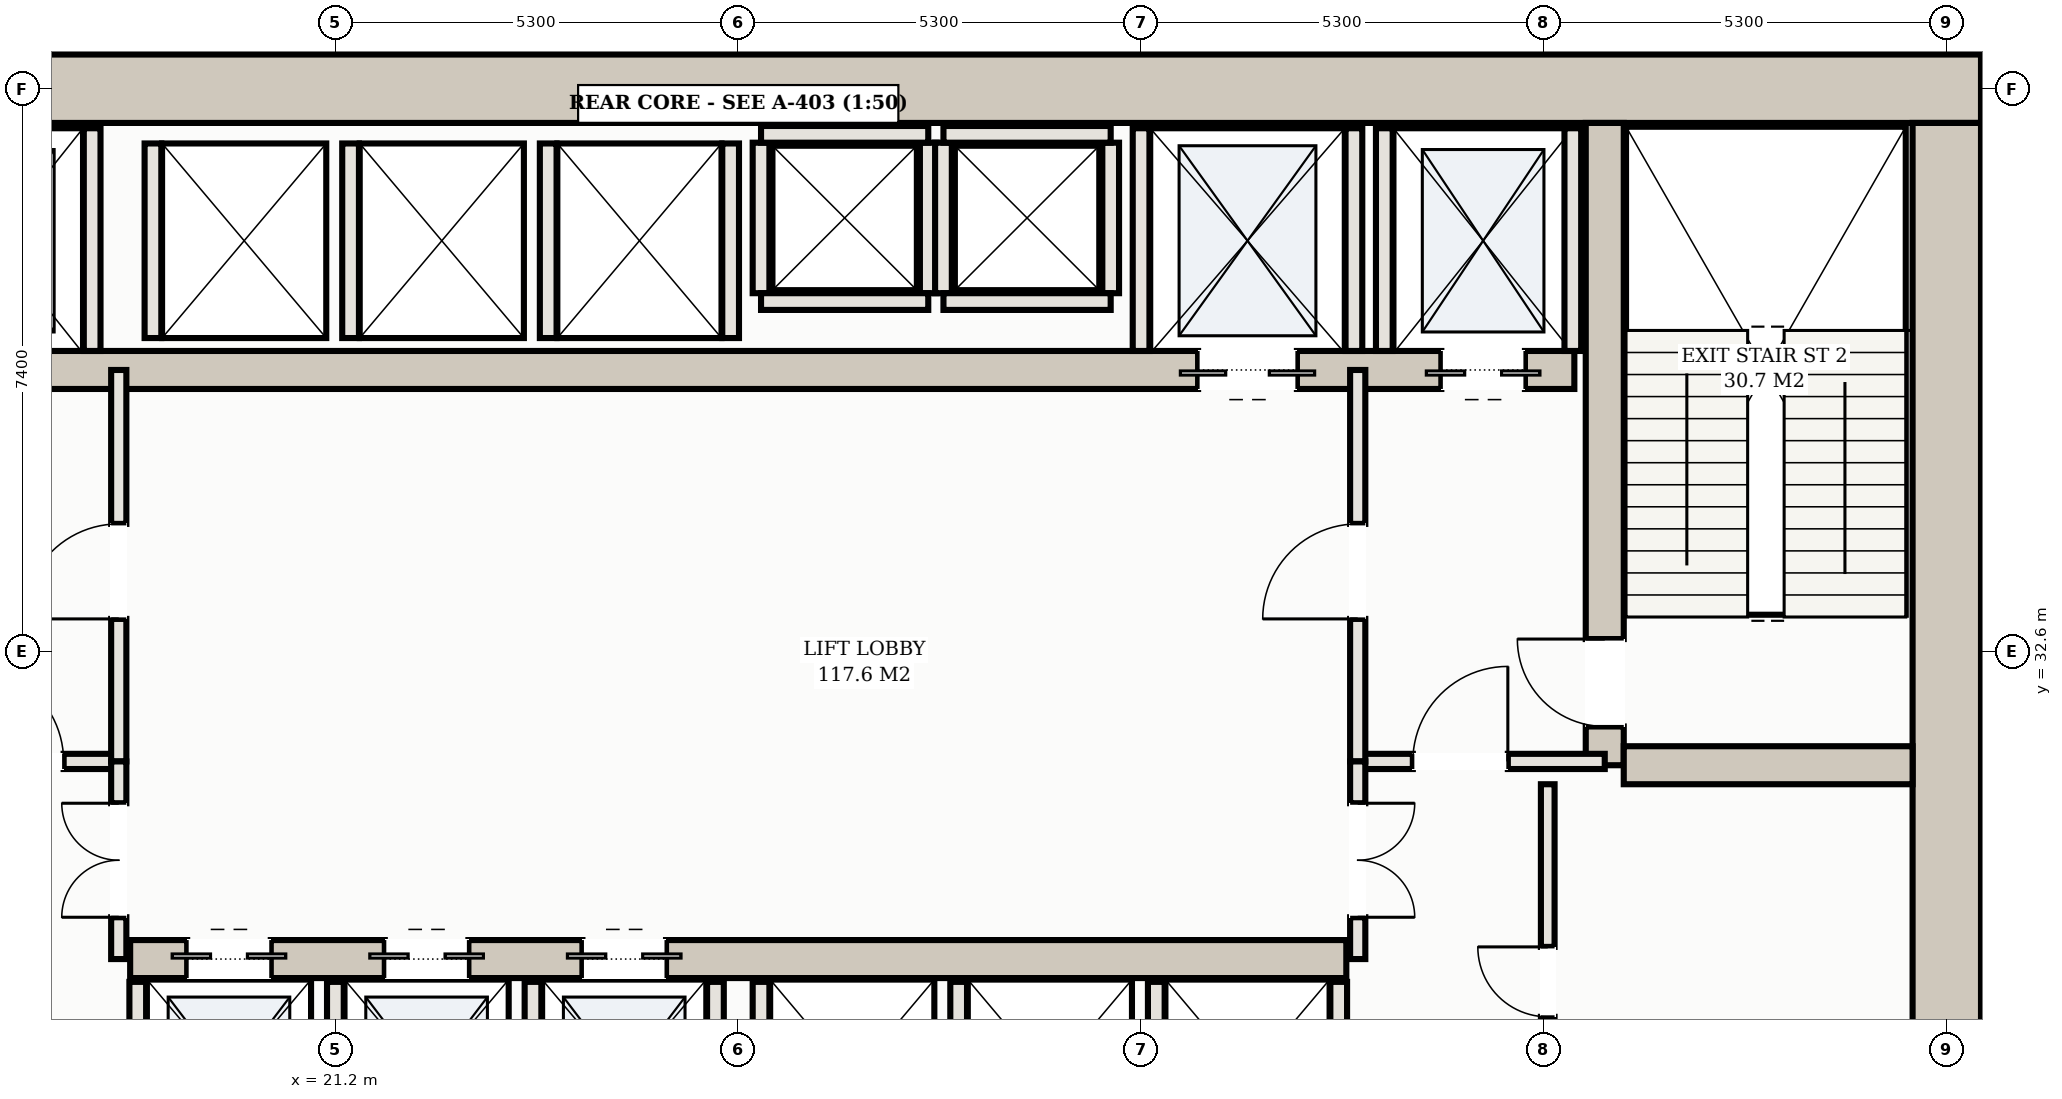
"""IFC4 building model, lengths in metres.
Left out: names, types, materials, properties, quantities, classifications, styles, units other than length and angle.
Written with IfcOpenShell. Run it as: python <this file> out.ifc"""

import sys

from ifc_helpers import new_model, si_unit, direction, frame, frame_2d, origin, place, context, subcontext, project, spatial, rectangle, extrude, element, fill, save


model = new_model("IFC4")
c1 = context("Model", 3, precision=1e-05, world=origin(), true_north=direction((0.0, 1.0)))
c2 = subcontext(c1, "Body", "Model", "MODEL_VIEW")
j1 = project(units=[si_unit("LENGTHUNIT", "METRE"), si_unit("PLANEANGLEUNIT", "RADIAN")], contexts=[c1])
p1 = place(None, origin())
s1 = spatial("IfcSite", under=j1, at=p1, CompositionType="ELEMENT")
p2 = place(p1, origin())
s2 = spatial("IfcBuilding", under=s1, at=p2, CompositionType="ELEMENT")
p3 = place(p2, frame((0.0, 0.0, 5.2)))
s3 = spatial("IfcBuildingStorey", under=s2, at=p3, CompositionType="ELEMENT", Elevation=5.2)
p4 = place(p3, frame((10.15, 40.0, 0.0), z_axis=(0.0, 0.0, 1.0), x_axis=(1.0, 0.0, 0.0)))
e1 = element("IfcWall", 1, at=p4, inside=s3, PredefinedType="SHEAR", context=c2, shape_type="SweptSolid", body=[
    extrude(rectangle(XDim=32.7, YDim=0.9, at=frame_2d((16.35, 0.0))), origin(), (0.0, 0.0, 1.0), 4.35),
])
p5 = place(p3, frame((42.4, 25.65, 0.0), z_axis=(0.0, 0.0, 1.0), x_axis=(0.0, 1.0, 0.0)))
e2 = element("IfcWall", 2, at=p5, inside=s3, PredefinedType="SHEAR", context=c2, shape_type="SweptSolid", body=[
    extrude(rectangle(XDim=13.9, YDim=0.9, at=frame_2d((6.95, 0.0))), origin(), (0.0, 0.0, 1.0), 4.35),
])
p6 = place(p3, frame((37.9, 31.1, 0.0), z_axis=(0.0, 0.0, 1.0), x_axis=(0.0, 1.0, 0.0)))
e3 = element("IfcWall", 3, at=p6, inside=s3, PredefinedType="SHEAR", context=c2, shape_type="SweptSolid", body=[
    extrude(rectangle(XDim=8.45, YDim=0.5, at=frame_2d((4.225, 0.0))), origin(), (0.0, 0.0, 1.0), 4.35),
])
p7 = place(p6, frame((0.51, 0.0, 0.0)))
e4 = element("IfcOpeningElement", 4, at=p7, cuts=e3, PredefinedType="OPENING", context=c2, shape_type="SweptSolid", body=[
    extrude(rectangle(XDim=1.15, YDim=2.2, at=frame_2d((0.575, 1.1))), frame((0.0, 0.26, 0.0), z_axis=(0.0, -1.0, 0.0), x_axis=(1.0, 0.0, 0.0)), (0.0, 0.0, 1.0), 0.52),
])
p8 = place(p3, frame((38.15, 31.1, 0.0), z_axis=(0.0, 0.0, 1.0), x_axis=(1.0, 0.0, 0.0)))
e5 = element("IfcWall", 5, at=p8, inside=s3, PredefinedType="SHEAR", context=c2, shape_type="SweptSolid", body=[
    extrude(rectangle(XDim=3.8, YDim=0.5, at=frame_2d((1.9, 0.0))), origin(), (0.0, 0.0, 1.0), 4.35),
])
p9 = place(p3, frame((15.5, 36.3, 0.0), z_axis=(0.0, 0.0, 1.0), x_axis=(1.0, 0.0, 0.0)))
e6 = element("IfcWall", 6, at=p9, inside=s3, PredefinedType="SHEAR", context=c2, shape_type="SweptSolid", body=[
    extrude(rectangle(XDim=22.0, YDim=0.5, at=frame_2d((11.0, 0.0))), origin(), (0.0, 0.0, 1.0), 4.35),
])
p10 = place(p9, frame((0.65, 0.0, 0.0)))
e7 = element("IfcOpeningElement", 7, at=p10, cuts=e6, PredefinedType="OPENING", context=c2, shape_type="SweptSolid", body=[
    extrude(rectangle(XDim=1.1, YDim=2.15, at=frame_2d((0.55, 1.075))), frame((0.0, 0.26, 0.0), z_axis=(0.0, -1.0, 0.0), x_axis=(1.0, 0.0, 0.0)), (0.0, 0.0, 1.0), 0.52),
])
p11 = place(p9, frame((20.25, 0.0, 0.0)))
e8 = element("IfcOpeningElement", 8, at=p11, cuts=e6, PredefinedType="OPENING", context=c2, shape_type="SweptSolid", body=[
    extrude(rectangle(XDim=1.1, YDim=2.15, at=frame_2d((0.55, 1.075))), frame((0.0, 0.26, 0.0), z_axis=(0.0, -1.0, 0.0), x_axis=(1.0, 0.0, 0.0)), (0.0, 0.0, 1.0), 0.52),
])
p12 = place(p9, frame((17.05, 0.0, 0.0)))
e9 = element("IfcOpeningElement", 9, at=p12, cuts=e6, PredefinedType="OPENING", context=c2, shape_type="SweptSolid", body=[
    extrude(rectangle(XDim=1.3, YDim=2.2, at=frame_2d((0.65, 1.1))), frame((0.0, 0.26, 0.0), z_axis=(0.0, -1.0, 0.0), x_axis=(1.0, 0.0, 0.0)), (0.0, 0.0, 1.0), 0.52),
])
p13 = place(p3, frame((18.5, 28.55, 0.0), z_axis=(0.0, 0.0, 1.0), x_axis=(1.0, 0.0, 0.0)))
e10 = element("IfcWall", 10, at=p13, inside=s3, PredefinedType="SHEAR", context=c2, shape_type="SweptSolid", body=[
    extrude(rectangle(XDim=16.0, YDim=0.5, at=frame_2d((8.0, 0.0))), origin(), (0.0, 0.0, 1.0), 4.35),
])
p14 = place(p13, frame((0.75, 0.0, 0.0)))
e11 = element("IfcOpeningElement", 11, at=p14, cuts=e10, PredefinedType="OPENING", context=c2, shape_type="SweptSolid", body=[
    extrude(rectangle(XDim=1.1, YDim=2.15, at=frame_2d((0.55, 1.075))), frame((0.0, 0.26, 0.0), z_axis=(0.0, -1.0, 0.0), x_axis=(1.0, 0.0, 0.0)), (0.0, 0.0, 1.0), 0.52),
])
p15 = place(p13, frame((3.35, 0.0, 0.0)))
e12 = element("IfcOpeningElement", 12, at=p15, cuts=e10, PredefinedType="OPENING", context=c2, shape_type="SweptSolid", body=[
    extrude(rectangle(XDim=1.1, YDim=2.15, at=frame_2d((0.55, 1.075))), frame((0.0, 0.26, 0.0), z_axis=(0.0, -1.0, 0.0), x_axis=(1.0, 0.0, 0.0)), (0.0, 0.0, 1.0), 0.52),
])
p16 = place(p13, frame((5.95, 0.0, 0.0)))
e13 = element("IfcOpeningElement", 13, at=p16, cuts=e10, PredefinedType="OPENING", context=c2, shape_type="SweptSolid", body=[
    extrude(rectangle(XDim=1.1, YDim=2.15, at=frame_2d((0.55, 1.075))), frame((0.0, 0.26, 0.0), z_axis=(0.0, -1.0, 0.0), x_axis=(1.0, 0.0, 0.0)), (0.0, 0.0, 1.0), 0.52),
])
for number, where, z_axis, x_axis in (
    (14, (18.0, 36.55, 0.0), (0.0, 0.0, 1.0), (0.0, 1.0, 0.0)),
    (15, (35.0, 36.55, 0.0), (0.0, 0.0, 1.0), (0.0, 1.0, 0.0)),
    (16, (37.48, 36.55, 0.0), (0.0, 0.0, 1.0), (0.0, 1.0, 0.0)),
    (17, (31.8, 36.55, 0.0), (0.0, 0.0, 1.0), (0.0, 1.0, 0.0)),
    (18, (34.6, 36.55, 0.0), (0.0, 0.0, 1.0), (0.0, 1.0, 0.0)),
):
    element("IfcWall", number, at=place(p3, frame(where, z_axis=z_axis, x_axis=x_axis)), inside=s3, PredefinedType="SOLIDWALL", context=c2, shape_type="SweptSolid", body=[
        extrude(rectangle(XDim=2.93, YDim=0.22, at=frame_2d((1.465, 0.0))), origin(), (0.0, 0.0, 1.0), 4.35),
    ])
for number, where, z_axis, x_axis in (
    (19, (18.6, 25.72, 0.0), (0.0, 0.0, 1.0), (0.0, 1.0, 0.0)),
    (20, (21.2, 25.72, 0.0), (0.0, 0.0, 1.0), (0.0, 1.0, 0.0)),
    (21, (23.8, 25.72, 0.0), (0.0, 0.0, 1.0), (0.0, 1.0, 0.0)),
    (22, (26.2, 25.72, 0.0), (0.0, 0.0, 1.0), (0.0, 1.0, 0.0)),
    (23, (26.8, 25.72, 0.0), (0.0, 0.0, 1.0), (0.0, 1.0, 0.0)),
    (24, (29.4, 25.72, 0.0), (0.0, 0.0, 1.0), (0.0, 1.0, 0.0)),
    (25, (32.0, 25.72, 0.0), (0.0, 0.0, 1.0), (0.0, 1.0, 0.0)),
    (26, (34.4, 25.72, 0.0), (0.0, 0.0, 1.0), (0.0, 1.0, 0.0)),
):
    element("IfcWall", number, at=place(p3, frame(where, z_axis=z_axis, x_axis=x_axis)), inside=s3, PredefinedType="SOLIDWALL", context=c2, shape_type="SweptSolid", body=[
        extrude(rectangle(XDim=2.53, YDim=0.22, at=frame_2d((1.265, 0.0))), origin(), (0.0, 0.0, 1.0), 4.35),
    ])
for number, where, z_axis, x_axis in (
    (27, (18.8, 36.72, 0.0), (0.0, 0.0, 1.0), (0.0, 1.0, 0.0)),
    (28, (21.4, 36.72, 0.0), (0.0, 0.0, 1.0), (0.0, 1.0, 0.0)),
    (29, (24.0, 36.72, 0.0), (0.0, 0.0, 1.0), (0.0, 1.0, 0.0)),
    (30, (26.4, 36.72, 0.0), (0.0, 0.0, 1.0), (0.0, 1.0, 0.0)),
):
    element("IfcWall", number, at=place(p3, frame(where, z_axis=z_axis, x_axis=x_axis)), inside=s3, PredefinedType="SOLIDWALL", context=c2, shape_type="SweptSolid", body=[
        extrude(rectangle(XDim=2.56, YDim=0.22, at=frame_2d((1.28, 0.0))), origin(), (0.0, 0.0, 1.0), 4.35),
    ])
for number, where, z_axis, x_axis in (
    (31, (26.8, 37.31, 0.0), (0.0, 0.0, 1.0), (0.0, 1.0, 0.0)),
    (32, (29.0, 37.31, 0.0), (0.0, 0.0, 1.0), (0.0, 1.0, 0.0)),
):
    element("IfcWall", number, at=place(p3, frame(where, z_axis=z_axis, x_axis=x_axis)), inside=s3, PredefinedType="SOLIDWALL", context=c2, shape_type="SweptSolid", body=[
        extrude(rectangle(XDim=1.98, YDim=0.22, at=frame_2d((0.99, 0.0))), origin(), (0.0, 0.0, 1.0), 4.35),
    ])
for number, where, z_axis, x_axis in (
    (33, (26.8, 39.4, 0.0), (0.0, 0.0, 1.0), (1.0, 0.0, 0.0)),
    (34, (26.8, 37.2, 0.0), (0.0, 0.0, 1.0), (1.0, 0.0, 0.0)),
):
    element("IfcWall", number, at=place(p3, frame(where, z_axis=z_axis, x_axis=x_axis)), inside=s3, PredefinedType="SOLIDWALL", context=c2, shape_type="SweptSolid", body=[
        extrude(rectangle(XDim=2.2, YDim=0.22, at=frame_2d((1.1, 0.0))), origin(), (0.0, 0.0, 1.0), 4.35),
    ])
for number, where, z_axis, x_axis in (
    (35, (29.2, 37.31, 0.0), (0.0, 0.0, 1.0), (0.0, 1.0, 0.0)),
    (36, (31.4, 37.31, 0.0), (0.0, 0.0, 1.0), (0.0, 1.0, 0.0)),
):
    element("IfcWall", number, at=place(p3, frame(where, z_axis=z_axis, x_axis=x_axis)), inside=s3, PredefinedType="SOLIDWALL", context=c2, shape_type="SweptSolid", body=[
        extrude(rectangle(XDim=1.98, YDim=0.22, at=frame_2d((0.99, 0.0))), origin(), (0.0, 0.0, 1.0), 4.35),
    ])
for number, where, z_axis, x_axis in (
    (37, (29.2, 39.4, 0.0), (0.0, 0.0, 1.0), (1.0, 0.0, 0.0)),
    (38, (29.2, 37.2, 0.0), (0.0, 0.0, 1.0), (1.0, 0.0, 0.0)),
):
    element("IfcWall", number, at=place(p3, frame(where, z_axis=z_axis, x_axis=x_axis)), inside=s3, PredefinedType="SOLIDWALL", context=c2, shape_type="SweptSolid", body=[
        extrude(rectangle(XDim=2.2, YDim=0.22, at=frame_2d((1.1, 0.0))), origin(), (0.0, 0.0, 1.0), 4.35),
    ])
p17 = place(p3, frame((15.1, 31.15, 0.0), z_axis=(0.0, 0.0, 1.0), x_axis=(1.0, 0.0, 0.0)))
e39 = element("IfcWall", 39, at=p17, inside=s3, PredefinedType="PARTITIONING", context=c2, shape_type="SweptSolid", body=[
    extrude(rectangle(XDim=3.25, YDim=0.2, at=frame_2d((1.625, 0.0))), origin(), (0.0, 0.0, 1.0), 4.35),
])
p18 = place(p17, frame((1.275, 0.0, 0.0)))
e40 = element("IfcOpeningElement", 40, at=p18, cuts=e39, PredefinedType="OPENING", context=c2, shape_type="SweptSolid", body=[
    extrude(rectangle(XDim=1.25, YDim=2.2, at=frame_2d((0.625, 1.1))), frame((0.0, 0.11, 0.0), z_axis=(0.0, -1.0, 0.0), x_axis=(1.0, 0.0, 0.0)), (0.0, 0.0, 1.0), 0.22),
])
p19 = place(p3, frame((18.35, 31.15, 0.0), z_axis=(0.0, 0.0, 1.0), x_axis=(0.0, 1.0, 0.0)))
e41 = element("IfcWall", 41, at=p19, inside=s3, PredefinedType="PARTITIONING", context=c2, shape_type="SweptSolid", body=[
    extrude(rectangle(XDim=5.15, YDim=0.2, at=frame_2d((2.575, 0.0))), origin(), (0.0, 0.0, 1.0), 4.35),
])
p20 = place(p19, frame((1.875, 0.0, 0.0)))
e42 = element("IfcOpeningElement", 42, at=p20, cuts=e41, PredefinedType="OPENING", context=c2, shape_type="SweptSolid", body=[
    extrude(rectangle(XDim=1.25, YDim=2.2, at=frame_2d((0.625, 1.1))), frame((0.0, 0.11, 0.0), z_axis=(0.0, -1.0, 0.0), x_axis=(1.0, 0.0, 0.0)), (0.0, 0.0, 1.0), 0.22),
])
p21 = place(p3, frame((34.65, 31.15, 0.0), z_axis=(0.0, 0.0, 1.0), x_axis=(1.0, 0.0, 0.0)))
e43 = element("IfcWall", 43, at=p21, inside=s3, PredefinedType="PARTITIONING", context=c2, shape_type="SweptSolid", body=[
    extrude(rectangle(XDim=3.25, YDim=0.2, at=frame_2d((1.625, 0.0))), origin(), (0.0, 0.0, 1.0), 4.35),
])
p22 = place(p21, frame((0.725, 0.0, 0.0)))
e44 = element("IfcOpeningElement", 44, at=p22, cuts=e43, PredefinedType="OPENING", context=c2, shape_type="SweptSolid", body=[
    extrude(rectangle(XDim=1.25, YDim=2.2, at=frame_2d((0.625, 1.1))), frame((0.0, 0.11, 0.0), z_axis=(0.0, -1.0, 0.0), x_axis=(1.0, 0.0, 0.0)), (0.0, 0.0, 1.0), 0.22),
])
p23 = place(p3, frame((34.65, 31.15, 0.0), z_axis=(0.0, 0.0, 1.0), x_axis=(0.0, 1.0, 0.0)))
e45 = element("IfcWall", 45, at=p23, inside=s3, PredefinedType="PARTITIONING", context=c2, shape_type="SweptSolid", body=[
    extrude(rectangle(XDim=5.15, YDim=0.2, at=frame_2d((2.575, 0.0))), origin(), (0.0, 0.0, 1.0), 4.35),
])
p24 = place(p23, frame((1.875, 0.0, 0.0)))
e46 = element("IfcOpeningElement", 46, at=p24, cuts=e45, PredefinedType="OPENING", context=c2, shape_type="SweptSolid", body=[
    extrude(rectangle(XDim=1.25, YDim=2.2, at=frame_2d((0.625, 1.1))), frame((0.0, 0.11, 0.0), z_axis=(0.0, -1.0, 0.0), x_axis=(1.0, 0.0, 0.0)), (0.0, 0.0, 1.0), 0.22),
])
p25 = place(p3, frame((37.15, 25.65, 0.0), z_axis=(0.0, 0.0, 1.0), x_axis=(0.0, 1.0, 0.0)))
e47 = element("IfcWall", 47, at=p25, inside=s3, PredefinedType="PARTITIONING", context=c2, shape_type="SweptSolid", body=[
    extrude(rectangle(XDim=5.2, YDim=0.18, at=frame_2d((2.6, 0.0))), origin(), (0.0, 0.0, 1.0), 4.35),
])
p26 = place(p25, frame((2.14, 0.0, 0.0)))
e48 = element("IfcOpeningElement", 48, at=p26, cuts=e47, PredefinedType="OPENING", context=c2, shape_type="SweptSolid", body=[
    extrude(rectangle(XDim=0.92, YDim=2.15, at=frame_2d((0.46, 1.075))), frame((0.0, 0.1, 0.0), z_axis=(0.0, -1.0, 0.0), x_axis=(1.0, 0.0, 0.0)), (0.0, 0.0, 1.0), 0.2),
])
p27 = place(p3, frame((18.35, 28.55, 0.0), z_axis=(0.0, 0.0, 1.0), x_axis=(0.0, 1.0, 0.0)))
e49 = element("IfcWall", 49, at=p27, inside=s3, PredefinedType="PARTITIONING", context=c2, shape_type="SweptSolid", body=[
    extrude(rectangle(XDim=2.6, YDim=0.2, at=frame_2d((1.3, 0.0))), origin(), (0.0, 0.0, 1.0), 4.35),
])
p28 = place(p27, frame((0.55, 0.0, 0.0)))
e50 = element("IfcOpeningElement", 50, at=p28, cuts=e49, PredefinedType="OPENING", context=c2, shape_type="SweptSolid", body=[
    extrude(rectangle(XDim=1.5, YDim=2.25, at=frame_2d((0.75, 1.125))), frame((0.0, 0.11, 0.0), z_axis=(0.0, -1.0, 0.0), x_axis=(1.0, 0.0, 0.0)), (0.0, 0.0, 1.0), 0.22),
])
p29 = place(p3, frame((34.65, 28.55, 0.0), z_axis=(0.0, 0.0, 1.0), x_axis=(0.0, 1.0, 0.0)))
e51 = element("IfcWall", 51, at=p29, inside=s3, PredefinedType="PARTITIONING", context=c2, shape_type="SweptSolid", body=[
    extrude(rectangle(XDim=2.6, YDim=0.2, at=frame_2d((1.3, 0.0))), origin(), (0.0, 0.0, 1.0), 4.35),
])
p30 = place(p29, frame((0.55, 0.0, 0.0)))
e52 = element("IfcOpeningElement", 52, at=p30, cuts=e51, PredefinedType="OPENING", context=c2, shape_type="SweptSolid", body=[
    extrude(rectangle(XDim=1.5, YDim=2.25, at=frame_2d((0.75, 1.125))), frame((0.0, 0.11, 0.0), z_axis=(0.0, -1.0, 0.0), x_axis=(1.0, 0.0, 0.0)), (0.0, 0.0, 1.0), 0.22),
])
p31 = place(p11, frame((1.1, 0.0, 0.0), z_axis=(0.0, 0.0, 1.0), x_axis=(-1.0, 0.0, 0.0)))
e53 = element("IfcDoor", 53, at=p31, inside=s3, OperationType="DOUBLE_DOOR_SLIDING", PredefinedType="DOOR", context=c2, shape_type="SweptSolid", body=[
    extrude(rectangle(XDim=1.1, YDim=2.15, at=frame_2d((0.55, 1.075))), frame((0.0, 0.025, 0.0), z_axis=(0.0, -1.0, 0.0), x_axis=(1.0, 0.0, 0.0)), (0.0, 0.0, 1.0), 0.05),
])
fill(e8, e53)
p32 = place(p12, frame((1.3, 0.0, 0.0), z_axis=(0.0, 0.0, 1.0), x_axis=(-1.0, 0.0, 0.0)))
e54 = element("IfcDoor", 54, at=p32, inside=s3, OperationType="DOUBLE_DOOR_SLIDING", PredefinedType="DOOR", context=c2, shape_type="SweptSolid", body=[
    extrude(rectangle(XDim=1.3, YDim=2.2, at=frame_2d((0.65, 1.1))), frame((0.0, 0.025, 0.0), z_axis=(0.0, -1.0, 0.0), x_axis=(1.0, 0.0, 0.0)), (0.0, 0.0, 1.0), 0.05),
])
fill(e9, e54)
p33 = place(p14, origin())
e55 = element("IfcDoor", 55, at=p33, inside=s3, OperationType="DOUBLE_DOOR_SLIDING", PredefinedType="DOOR", context=c2, shape_type="SweptSolid", body=[
    extrude(rectangle(XDim=1.1, YDim=2.15, at=frame_2d((0.55, 1.075))), frame((0.0, 0.025, 0.0), z_axis=(0.0, -1.0, 0.0), x_axis=(1.0, 0.0, 0.0)), (0.0, 0.0, 1.0), 0.05),
])
fill(e11, e55)
p34 = place(p15, origin())
e56 = element("IfcDoor", 56, at=p34, inside=s3, OperationType="DOUBLE_DOOR_SLIDING", PredefinedType="DOOR", context=c2, shape_type="SweptSolid", body=[
    extrude(rectangle(XDim=1.1, YDim=2.15, at=frame_2d((0.55, 1.075))), frame((0.0, 0.025, 0.0), z_axis=(0.0, -1.0, 0.0), x_axis=(1.0, 0.0, 0.0)), (0.0, 0.0, 1.0), 0.05),
])
fill(e12, e56)
p35 = place(p16, origin())
e57 = element("IfcDoor", 57, at=p35, inside=s3, OperationType="DOUBLE_DOOR_SLIDING", PredefinedType="DOOR", context=c2, shape_type="SweptSolid", body=[
    extrude(rectangle(XDim=1.1, YDim=2.15, at=frame_2d((0.55, 1.075))), frame((0.0, 0.025, 0.0), z_axis=(0.0, -1.0, 0.0), x_axis=(1.0, 0.0, 0.0)), (0.0, 0.0, 1.0), 0.05),
])
fill(e13, e57)
p36 = place(p18, origin())
e58 = element("IfcDoor", 58, at=p36, inside=s3, OperationType="SINGLE_SWING_LEFT", PredefinedType="DOOR", context=c2, shape_type="SweptSolid", body=[
    extrude(rectangle(XDim=1.25, YDim=2.2, at=frame_2d((0.625, 1.1))), frame((0.0, 0.025, 0.0), z_axis=(0.0, -1.0, 0.0), x_axis=(1.0, 0.0, 0.0)), (0.0, 0.0, 1.0), 0.05),
])
fill(e40, e58)
p37 = place(p20, origin())
e59 = element("IfcDoor", 59, at=p37, inside=s3, OperationType="SINGLE_SWING_LEFT", PredefinedType="DOOR", context=c2, shape_type="SweptSolid", body=[
    extrude(rectangle(XDim=1.25, YDim=2.2, at=frame_2d((0.625, 1.1))), frame((0.0, 0.025, 0.0), z_axis=(0.0, -1.0, 0.0), x_axis=(1.0, 0.0, 0.0)), (0.0, 0.0, 1.0), 0.05),
])
fill(e42, e59)
p38 = place(p22, origin())
e60 = element("IfcDoor", 60, at=p38, inside=s3, OperationType="SINGLE_SWING_RIGHT", PredefinedType="DOOR", context=c2, shape_type="SweptSolid", body=[
    extrude(rectangle(XDim=1.25, YDim=2.2, at=frame_2d((0.625, 1.1))), frame((0.0, 0.025, 0.0), z_axis=(0.0, -1.0, 0.0), x_axis=(1.0, 0.0, 0.0)), (0.0, 0.0, 1.0), 0.05),
])
fill(e44, e60)
p39 = place(p24, origin())
e61 = element("IfcDoor", 61, at=p39, inside=s3, OperationType="SINGLE_SWING_LEFT", PredefinedType="DOOR", context=c2, shape_type="SweptSolid", body=[
    extrude(rectangle(XDim=1.25, YDim=2.2, at=frame_2d((0.625, 1.1))), frame((0.0, 0.025, 0.0), z_axis=(0.0, -1.0, 0.0), x_axis=(1.0, 0.0, 0.0)), (0.0, 0.0, 1.0), 0.05),
])
fill(e46, e61)
p40 = place(p7, origin())
e62 = element("IfcDoor", 62, at=p40, inside=s3, OperationType="SINGLE_SWING_RIGHT", PredefinedType="DOOR", context=c2, shape_type="SweptSolid", body=[
    extrude(rectangle(XDim=1.15, YDim=2.2, at=frame_2d((0.575, 1.1))), frame((0.0, 0.025, 0.0), z_axis=(0.0, -1.0, 0.0), x_axis=(1.0, 0.0, 0.0)), (0.0, 0.0, 1.0), 0.05),
])
fill(e4, e62)
p41 = place(p26, origin())
e63 = element("IfcDoor", 63, at=p41, inside=s3, OperationType="SINGLE_SWING_RIGHT", PredefinedType="DOOR", context=c2, shape_type="SweptSolid", body=[
    extrude(rectangle(XDim=0.92, YDim=2.15, at=frame_2d((0.46, 1.075))), frame((0.0, 0.025, 0.0), z_axis=(0.0, -1.0, 0.0), x_axis=(1.0, 0.0, 0.0)), (0.0, 0.0, 1.0), 0.05),
])
fill(e48, e63)
p42 = place(p28, origin())
e64 = element("IfcDoor", 64, at=p42, inside=s3, OperationType="DOUBLE_DOOR_SINGLE_SWING", PredefinedType="DOOR", context=c2, shape_type="SweptSolid", body=[
    extrude(rectangle(XDim=1.5, YDim=2.25, at=frame_2d((0.75, 1.125))), frame((0.0, 0.025, 0.0), z_axis=(0.0, -1.0, 0.0), x_axis=(1.0, 0.0, 0.0)), (0.0, 0.0, 1.0), 0.05),
])
fill(e50, e64)
p43 = place(p30, frame((1.5, 0.0, 0.0), z_axis=(0.0, 0.0, 1.0), x_axis=(-1.0, 0.0, 0.0)))
e65 = element("IfcDoor", 65, at=p43, inside=s3, OperationType="DOUBLE_DOOR_SINGLE_SWING", PredefinedType="DOOR", context=c2, shape_type="SweptSolid", body=[
    extrude(rectangle(XDim=1.5, YDim=2.25, at=frame_2d((0.75, 1.125))), frame((0.0, 0.025, 0.0), z_axis=(0.0, -1.0, 0.0), x_axis=(1.0, 0.0, 0.0)), (0.0, 0.0, 1.0), 0.05),
])
fill(e52, e65)
save(model, sys.argv[1])
